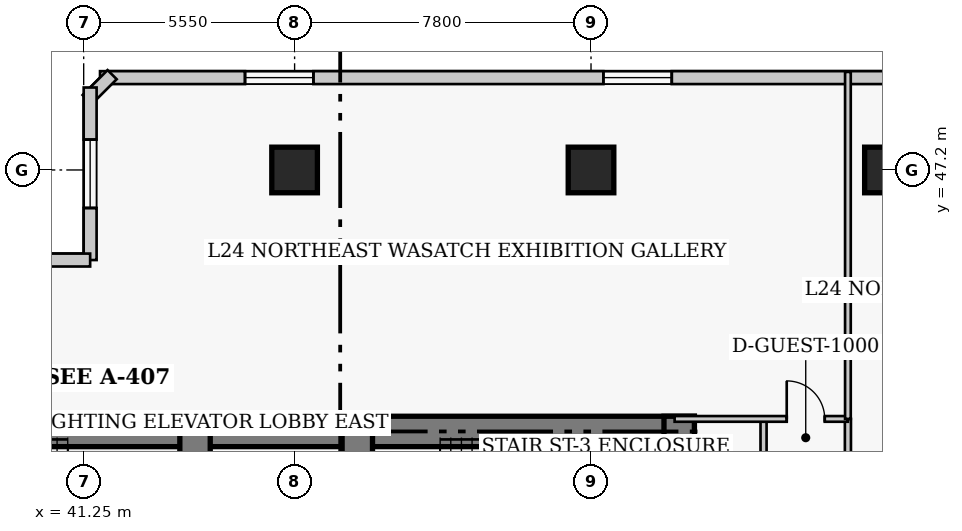
"""IFC4 building model, lengths in metres.
Left out: names, types, materials, properties, quantities, classifications, styles, units other than length and angle.
Written with IfcOpenShell. Run it as: python <this file> out.ifc"""

import sys

from ifc_helpers import new_model, si_unit, direction, frame, frame_2d, origin, origin_2d, place, context, subcontext, project, spatial, rectangle, extrude, element, fill, save


model = new_model("IFC4")
c1 = context("Model", 3, precision=1e-05, world=origin(), true_north=direction((0.0, 1.0)))
c2 = subcontext(c1, "Body", "Model", "MODEL_VIEW")
j1 = project(units=[si_unit("LENGTHUNIT", "METRE"), si_unit("PLANEANGLEUNIT", "RADIAN")], contexts=[c1])
p1 = place(None, origin())
s1 = spatial("IfcSite", under=j1, at=p1, CompositionType="ELEMENT")
p2 = place(p1, origin())
s2 = spatial("IfcBuilding", under=s1, at=p2, CompositionType="ELEMENT")
p3 = place(p2, frame((0.0, 0.0, 99.4)))
s3 = spatial("IfcBuildingStorey", under=s2, at=p3, CompositionType="ELEMENT", Elevation=99.4)
p4 = place(p3, frame((35.85, 40.32, 0.0), z_axis=(0.0, 0.0, 1.0), x_axis=(1.0, 0.0, 0.0)))
e1 = element("IfcWall", 1, at=p4, inside=s3, PredefinedType="SHEAR", context=c2, shape_type="SweptSolid", body=[
    extrude(rectangle(XDim=12.6, YDim=0.8, at=frame_2d((6.3, 0.0))), origin(), (0.0, 0.0, 1.0), 3.8),
])
p5 = place(p3, frame((48.45, 40.32, 0.0), z_axis=(0.0, 0.0, 1.0), x_axis=(1.0, 0.0, 0.0)))
e2 = element("IfcWall", 2, at=p5, inside=s3, PredefinedType="SHEAR", context=c2, shape_type="SweptSolid", body=[
    extrude(rectangle(XDim=8.87, YDim=0.8, at=frame_2d((4.435, 0.0))), origin(), (0.0, 0.0, 1.0), 3.8),
])
p6 = place(p3, frame((56.92, 27.05, 0.0), z_axis=(0.0, 0.0, 1.0), x_axis=(0.0, 1.0, 0.0)))
e3 = element("IfcWall", 3, at=p6, inside=s3, PredefinedType="SHEAR", context=c2, shape_type="SweptSolid", body=[
    extrude(rectangle(XDim=13.67, YDim=0.8, at=frame_2d((6.835, 0.0))), origin(), (0.0, 0.0, 1.0), 3.8),
])
p7 = place(p3, frame((44.18, 36.37, 0.0), z_axis=(0.0, 0.0, 1.0), x_axis=(0.0, 1.0, 0.0)))
e4 = element("IfcWall", 4, at=p7, inside=s3, PredefinedType="SHEAR", context=c2, shape_type="SweptSolid", body=[
    extrude(rectangle(XDim=3.95, YDim=0.8, at=frame_2d((1.975, 0.0))), origin(), (0.0, 0.0, 1.0), 3.8),
])
p8 = place(p3, frame((48.45, 32.35, 0.0), z_axis=(0.0, 0.0, 1.0), x_axis=(0.0, 1.0, 0.0)))
e5 = element("IfcWall", 5, at=p8, inside=s3, PredefinedType="SHEAR", context=c2, shape_type="SweptSolid", body=[
    extrude(rectangle(XDim=7.97, YDim=0.8, at=frame_2d((3.985, 0.0))), origin(), (0.0, 0.0, 1.0), 3.8),
])
p9 = place(p8, frame((5.85, 0.0, 0.0)))
e6 = element("IfcOpeningElement", 6, at=p9, cuts=e5, PredefinedType="OPENING", context=c2, shape_type="SweptSolid", body=[
    extrude(rectangle(XDim=1.1, YDim=2.15, at=frame_2d((0.55, 1.075))), frame((0.0, 0.41, 0.0), z_axis=(0.0, -1.0, 0.0), x_axis=(1.0, 0.0, 0.0)), (0.0, 0.0, 1.0), 0.82),
])
for number, where, z_axis, x_axis in (
    (7, (46.8, 47.2, 0.0), (0.0, 0.0, 1.0), (1.0, 0.0, 0.0)),
    (8, (54.6, 47.2, 0.0), (0.0, 0.0, 1.0), (1.0, 0.0, 0.0)),
    (9, (62.4, 47.2, 0.0), (0.0, 0.0, 1.0), (1.0, 0.0, 0.0)),
):
    element("IfcColumn", number, at=place(p3, frame(where, z_axis=z_axis, x_axis=x_axis)), inside=s3, PredefinedType="COLUMN", context=c2, shape_type="SweptSolid", body=[
        extrude(rectangle(XDim=1.2, YDim=1.2, at=origin_2d()), origin(), (0.0, 0.0, 1.0), 3.8),
    ])
p10 = place(p3, frame((69.97, 49.63, 0.0), z_axis=(0.0, 0.0, 1.0), x_axis=(-1.0, 0.0, 0.0)))
e10 = element("IfcWall", 10, at=p10, inside=s3, PredefinedType="SOLIDWALL", context=c2, shape_type="SweptSolid", body=[
    extrude(rectangle(XDim=28.29, YDim=0.34, at=frame_2d((14.145, 0.0))), origin(), (0.0, 0.0, 1.0), 3.54),
])
p11 = place(p10, frame((3.815, 0.0, 0.85)))
e11 = element("IfcOpeningElement", 11, at=p11, cuts=e10, PredefinedType="OPENING", context=c2, shape_type="SweptSolid", body=[
    extrude(rectangle(XDim=1.8, YDim=1.8, at=frame_2d((0.9, 0.9))), frame((0.0, 0.18, 0.0), z_axis=(0.0, -1.0, 0.0), x_axis=(1.0, 0.0, 0.0)), (0.0, 0.0, 1.0), 0.36),
])
p12 = place(p10, frame((13.245, 0.0, 0.85)))
e12 = element("IfcOpeningElement", 12, at=p12, cuts=e10, PredefinedType="OPENING", context=c2, shape_type="SweptSolid", body=[
    extrude(rectangle(XDim=1.8, YDim=1.8, at=frame_2d((0.9, 0.9))), frame((0.0, 0.18, 0.0), z_axis=(0.0, -1.0, 0.0), x_axis=(1.0, 0.0, 0.0)), (0.0, 0.0, 1.0), 0.36),
])
p13 = place(p10, frame((22.675, 0.0, 0.85)))
e13 = element("IfcOpeningElement", 13, at=p13, cuts=e10, PredefinedType="OPENING", context=c2, shape_type="SweptSolid", body=[
    extrude(rectangle(XDim=1.8, YDim=1.8, at=frame_2d((0.9, 0.9))), frame((0.0, 0.18, 0.0), z_axis=(0.0, -1.0, 0.0), x_axis=(1.0, 0.0, 0.0)), (0.0, 0.0, 1.0), 0.36),
])
p14 = place(p3, frame((41.999, 49.708, 0.0), z_axis=(0.0, 0.0, 1.0), x_axis=(-0.707238225886, -0.706975312048, 0.0)))
e14 = element("IfcWall", 14, at=p14, inside=s3, PredefinedType="SOLIDWALL", context=c2, shape_type="SweptSolid", body=[
    extrude(rectangle(XDim=0.929, YDim=0.34, at=frame_2d((0.464, 0.0))), origin(), (0.0, 0.0, 1.0), 3.54),
])
p15 = place(p3, frame((41.42, 49.37, 0.0), z_axis=(0.0, 0.0, 1.0), x_axis=(0.0, -1.0, 0.0)))
e15 = element("IfcWall", 15, at=p15, inside=s3, PredefinedType="SOLIDWALL", context=c2, shape_type="SweptSolid", body=[
    extrude(rectangle(XDim=4.54, YDim=0.34, at=frame_2d((2.27, 0.0))), origin(), (0.0, 0.0, 1.0), 3.54),
])
p16 = place(p15, frame((1.37, 0.0, 0.85)))
e16 = element("IfcOpeningElement", 16, at=p16, cuts=e15, PredefinedType="OPENING", context=c2, shape_type="SweptSolid", body=[
    extrude(rectangle(XDim=1.8, YDim=1.8, at=frame_2d((0.9, 0.9))), frame((0.0, 0.18, 0.0), z_axis=(0.0, -1.0, 0.0), x_axis=(1.0, 0.0, 0.0)), (0.0, 0.0, 1.0), 0.36),
])
p17 = place(p3, frame((41.42, 44.83, 0.0), z_axis=(0.0, 0.0, 1.0), x_axis=(-1.0, 0.0, 0.0)))
e17 = element("IfcWall", 17, at=p17, inside=s3, PredefinedType="SOLIDWALL", context=c2, shape_type="SweptSolid", body=[
    extrude(rectangle(XDim=4.84, YDim=0.34, at=frame_2d((2.42, 0.0))), origin(), (0.0, 0.0, 1.0), 3.54),
])
p18 = place(p17, frame((1.52, 0.0, 0.85)))
e18 = element("IfcOpeningElement", 18, at=p18, cuts=e17, PredefinedType="OPENING", context=c2, shape_type="SweptSolid", body=[
    extrude(rectangle(XDim=1.8, YDim=1.8, at=frame_2d((0.9, 0.9))), frame((0.0, 0.18, 0.0), z_axis=(0.0, -1.0, 0.0), x_axis=(1.0, 0.0, 0.0)), (0.0, 0.0, 1.0), 0.36),
])
p19 = place(p3, frame((61.36, 11.85, 0.0), z_axis=(0.0, 0.0, 1.0), x_axis=(0.0, 1.0, 0.0)))
e19 = element("IfcWall", 19, at=p19, inside=s3, PredefinedType="PARTITIONING", context=c2, shape_type="SweptSolid", body=[
    extrude(rectangle(XDim=28.8, YDim=0.16, at=frame_2d((14.4, 0.0))), origin(), (0.0, 0.0, 1.0), 3.54),
])
p20 = place(p19, frame((3.6, 0.0, 0.0)))
e20 = element("IfcOpeningElement", 20, at=p20, cuts=e19, PredefinedType="OPENING", context=c2, shape_type="SweptSolid", body=[
    extrude(rectangle(XDim=0.95, YDim=2.1, at=frame_2d((0.475, 1.05))), frame((0.0, 0.09, 0.0), z_axis=(0.0, -1.0, 0.0), x_axis=(1.0, 0.0, 0.0)), (0.0, 0.0, 1.0), 0.18),
])
p21 = place(p19, frame((12.075, 0.0, 0.0)))
e21 = element("IfcOpeningElement", 21, at=p21, cuts=e19, PredefinedType="OPENING", context=c2, shape_type="SweptSolid", body=[
    extrude(rectangle(XDim=0.95, YDim=2.1, at=frame_2d((0.475, 1.05))), frame((0.0, 0.09, 0.0), z_axis=(0.0, -1.0, 0.0), x_axis=(1.0, 0.0, 0.0)), (0.0, 0.0, 1.0), 0.18),
])
p22 = place(p19, frame((19.875, 0.0, 0.0)))
e22 = element("IfcOpeningElement", 22, at=p22, cuts=e19, PredefinedType="OPENING", context=c2, shape_type="SweptSolid", body=[
    extrude(rectangle(XDim=0.95, YDim=2.1, at=frame_2d((0.475, 1.05))), frame((0.0, 0.09, 0.0), z_axis=(0.0, -1.0, 0.0), x_axis=(1.0, 0.0, 0.0)), (0.0, 0.0, 1.0), 0.18),
])
p23 = place(p19, frame((24.3, 0.0, 0.0)))
e23 = element("IfcOpeningElement", 23, at=p23, cuts=e19, PredefinedType="OPENING", context=c2, shape_type="SweptSolid", body=[
    extrude(rectangle(XDim=1.0, YDim=2.15, at=frame_2d((0.5, 1.075))), frame((0.0, 0.09, 0.0), z_axis=(0.0, -1.0, 0.0), x_axis=(1.0, 0.0, 0.0)), (0.0, 0.0, 1.0), 0.18),
])
p24 = place(p3, frame((59.14, 24.66, 0.0), z_axis=(0.0, 0.0, 1.0), x_axis=(0.0, 1.0, 0.0)))
e24 = element("IfcWall", 24, at=p24, inside=s3, PredefinedType="PARTITIONING", context=c2, shape_type="SweptSolid", body=[
    extrude(rectangle(XDim=15.99, YDim=0.16, at=frame_2d((7.995, 0.0))), origin(), (0.0, 0.0, 1.0), 3.54),
])
p25 = place(p3, frame((56.8, 40.65, 0.0), z_axis=(0.0, 0.0, 1.0), x_axis=(1.0, 0.0, 0.0)))
e25 = element("IfcWall", 25, at=p25, inside=s3, PredefinedType="PARTITIONING", context=c2, shape_type="SweptSolid", body=[
    extrude(rectangle(XDim=4.56, YDim=0.15, at=frame_2d((2.28, 0.0))), origin(), (0.0, 0.0, 1.0), 3.54),
])
p26 = place(p25, frame((2.95, 0.0, 0.0)))
e26 = element("IfcOpeningElement", 26, at=p26, cuts=e25, PredefinedType="OPENING", context=c2, shape_type="SweptSolid", body=[
    extrude(rectangle(XDim=1.0, YDim=2.15, at=frame_2d((0.5, 1.075))), frame((0.0, 0.085, 0.0), z_axis=(0.0, -1.0, 0.0), x_axis=(1.0, 0.0, 0.0)), (0.0, 0.0, 1.0), 0.17),
])
p27 = place(p3, frame((61.36, 40.65, 0.0), z_axis=(0.0, 0.0, 1.0), x_axis=(0.0, 1.0, 0.0)))
e27 = element("IfcWall", 27, at=p27, inside=s3, PredefinedType="PARTITIONING", context=c2, shape_type="SweptSolid", body=[
    extrude(rectangle(XDim=9.13, YDim=0.15, at=frame_2d((4.565, 0.0))), origin(), (0.0, 0.0, 1.0), 3.54),
])
p28 = place(p12, origin())
e28 = element("IfcWindow", 28, at=p28, inside=s3, PartitioningType="SINGLE_PANEL", PredefinedType="WINDOW", context=c2, shape_type="SweptSolid", body=[
    extrude(rectangle(XDim=1.8, YDim=1.8, at=frame_2d((0.9, 0.9))), frame((0.0, 0.03, 0.0), z_axis=(0.0, -1.0, 0.0), x_axis=(1.0, 0.0, 0.0)), (0.0, 0.0, 1.0), 0.06),
])
fill(e12, e28)
p29 = place(p13, origin())
e29 = element("IfcWindow", 29, at=p29, inside=s3, PartitioningType="SINGLE_PANEL", PredefinedType="WINDOW", context=c2, shape_type="SweptSolid", body=[
    extrude(rectangle(XDim=1.8, YDim=1.8, at=frame_2d((0.9, 0.9))), frame((0.0, 0.03, 0.0), z_axis=(0.0, -1.0, 0.0), x_axis=(1.0, 0.0, 0.0)), (0.0, 0.0, 1.0), 0.06),
])
fill(e13, e29)
p30 = place(p16, origin())
e30 = element("IfcWindow", 30, at=p30, inside=s3, PartitioningType="SINGLE_PANEL", PredefinedType="WINDOW", context=c2, shape_type="SweptSolid", body=[
    extrude(rectangle(XDim=1.8, YDim=1.8, at=frame_2d((0.9, 0.9))), frame((0.0, 0.03, 0.0), z_axis=(0.0, -1.0, 0.0), x_axis=(1.0, 0.0, 0.0)), (0.0, 0.0, 1.0), 0.06),
])
fill(e16, e30)
p31 = place(p26, origin())
e31 = element("IfcDoor", 31, at=p31, inside=s3, OperationType="SINGLE_SWING_LEFT", PredefinedType="DOOR", context=c2, shape_type="SweptSolid", body=[
    extrude(rectangle(XDim=1.0, YDim=2.15, at=frame_2d((0.5, 1.075))), frame((0.0, 0.025, 0.0), z_axis=(0.0, -1.0, 0.0), x_axis=(1.0, 0.0, 0.0)), (0.0, 0.0, 1.0), 0.05),
])
fill(e26, e31)
save(model, sys.argv[1])
